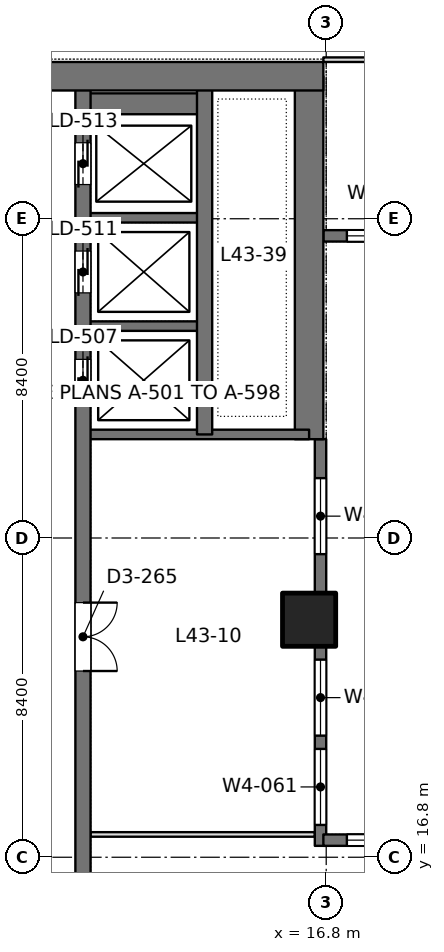
"""IFC4 building model, lengths in metres.
Left out: names, types, materials, properties, quantities, classifications, styles, units other than length and angle.
Written with IfcOpenShell. Run it as: python <this file> out.ifc"""

import sys

from ifc_helpers import new_model, si_unit, direction, frame, frame_2d, origin, origin_2d, place, context, subcontext, project, spatial, rectangle, extrude, element, fill, save


model = new_model("IFC4")
c1 = context("Model", 3, precision=1e-05, world=origin(), true_north=direction((0.0, 1.0)))
c2 = subcontext(c1, "Body", "Model", "MODEL_VIEW")
j1 = project(units=[si_unit("LENGTHUNIT", "METRE"), si_unit("PLANEANGLEUNIT", "RADIAN")], contexts=[c1])
p1 = place(None, origin())
s1 = spatial("IfcSite", under=j1, at=p1, CompositionType="ELEMENT")
p2 = place(p1, origin())
s2 = spatial("IfcBuilding", under=s1, at=p2, CompositionType="ELEMENT")
p3 = place(p2, frame((0.0, 0.0, 190.2)))
s3 = spatial("IfcBuildingStorey", under=s2, at=p3, CompositionType="ELEMENT", Elevation=190.2)
p4 = place(p3, frame((16.35, 23.05, 0.0), z_axis=(0.0, 0.0, 1.0), x_axis=(1.0, 0.0, 0.0)))
e1 = element("IfcColumn", 1, at=p4, inside=s3, PredefinedType="COLUMN", context=c2, shape_type="SweptSolid", body=[
    extrude(rectangle(XDim=1.4, YDim=1.4, at=origin_2d()), origin(), (0.0, 0.0, 1.0), 4.2),
])
p5 = place(p3, frame((-1.125, 37.35, 0.0), z_axis=(0.0, 0.0, 1.0), x_axis=(1.0, 0.0, 0.0)))
e2 = element("IfcWall", 2, at=p5, inside=s3, PredefinedType="SHEAR", context=c2, shape_type="SweptSolid", body=[
    extrude(rectangle(XDim=17.85, YDim=0.75, at=frame_2d((8.925, 0.0))), origin(), (0.0, 0.0, 1.0), 4.2),
])
p6 = place(p5, frame((8.875, 0.0, 0.0)))
e3 = element("IfcOpeningElement", 3, at=p6, cuts=e2, PredefinedType="OPENING", context=c2, shape_type="SweptSolid", body=[
    extrude(rectangle(XDim=1.8, YDim=2.4, at=frame_2d((0.9, 1.2))), frame((0.0, 0.385, 0.0), z_axis=(0.0, -1.0, 0.0), x_axis=(1.0, 0.0, 0.0)), (0.0, 0.0, 1.0), 0.77),
])
p7 = place(p3, frame((16.35, 27.8, 0.0), z_axis=(0.0, 0.0, 1.0), x_axis=(0.0, 1.0, 0.0)))
e4 = element("IfcWall", 4, at=p7, inside=s3, PredefinedType="SHEAR", context=c2, shape_type="SweptSolid", body=[
    extrude(rectangle(XDim=9.55, YDim=0.75, at=frame_2d((4.775, 0.0))), origin(), (0.0, 0.0, 1.0), 4.2),
])
p8 = place(p3, frame((10.4, 13.05, 0.0), z_axis=(0.0, 0.0, 1.0), x_axis=(0.0, 1.0, 0.0)))
e5 = element("IfcWall", 5, at=p8, inside=s3, PredefinedType="SHEAR", context=c2, shape_type="SweptSolid", body=[
    extrude(rectangle(XDim=24.3, YDim=0.4, at=frame_2d((12.15, 0.0))), origin(), (0.0, 0.0, 1.0), 4.2),
])
p9 = place(p8, frame((15.75, 0.0, 0.0)))
e6 = element("IfcOpeningElement", 6, at=p9, cuts=e5, PredefinedType="OPENING", context=c2, shape_type="SweptSolid", body=[
    extrude(rectangle(XDim=1.1, YDim=2.2, at=frame_2d((0.55, 1.1))), frame((0.0, 0.21, 0.0), z_axis=(0.0, -1.0, 0.0), x_axis=(1.0, 0.0, 0.0)), (0.0, 0.0, 1.0), 0.42),
])
p10 = place(p8, frame((18.6, 0.0, 0.0)))
e7 = element("IfcOpeningElement", 7, at=p10, cuts=e5, PredefinedType="OPENING", context=c2, shape_type="SweptSolid", body=[
    extrude(rectangle(XDim=1.1, YDim=2.2, at=frame_2d((0.55, 1.1))), frame((0.0, 0.21, 0.0), z_axis=(0.0, -1.0, 0.0), x_axis=(1.0, 0.0, 0.0)), (0.0, 0.0, 1.0), 0.42),
])
p11 = place(p8, frame((21.45, 0.0, 0.0)))
e8 = element("IfcOpeningElement", 8, at=p11, cuts=e5, PredefinedType="OPENING", context=c2, shape_type="SweptSolid", body=[
    extrude(rectangle(XDim=1.1, YDim=2.2, at=frame_2d((0.55, 1.1))), frame((0.0, 0.21, 0.0), z_axis=(0.0, -1.0, 0.0), x_axis=(1.0, 0.0, 0.0)), (0.0, 0.0, 1.0), 0.42),
])
p12 = place(p8, frame((8.65, 0.0, 0.0)))
e9 = element("IfcOpeningElement", 9, at=p12, cuts=e5, PredefinedType="OPENING", context=c2, shape_type="SweptSolid", body=[
    extrude(rectangle(XDim=1.8, YDim=2.4, at=frame_2d((0.9, 1.2))), frame((0.0, 0.21, 0.0), z_axis=(0.0, -1.0, 0.0), x_axis=(1.0, 0.0, 0.0)), (0.0, 0.0, 1.0), 0.42),
])
p13 = place(p3, frame((13.6, 27.925, 0.0), z_axis=(0.0, 0.0, 1.0), x_axis=(0.0, 1.0, 0.0)))
e10 = element("IfcWall", 10, at=p13, inside=s3, PredefinedType="SHEAR", context=c2, shape_type="SweptSolid", body=[
    extrude(rectangle(XDim=9.425, YDim=0.4, at=frame_2d((4.712, 0.0))), origin(), (0.0, 0.0, 1.0), 4.2),
])
p14 = place(p3, frame((10.4, 27.925, 0.0), z_axis=(0.0, 0.0, 1.0), x_axis=(1.0, 0.0, 0.0)))
e11 = element("IfcWall", 11, at=p14, inside=s3, PredefinedType="SHEAR", context=c2, shape_type="SweptSolid", body=[
    extrude(rectangle(XDim=5.95, YDim=0.25, at=frame_2d((2.975, 0.0))), origin(), (0.0, 0.0, 1.0), 4.2),
])
for number, where, z_axis, x_axis in (
    (12, (10.4, 30.775, 0.0), (0.0, 0.0, 1.0), (1.0, 0.0, 0.0)),
    (13, (10.4, 33.625, 0.0), (0.0, 0.0, 1.0), (1.0, 0.0, 0.0)),
):
    element("IfcWall", number, at=place(p3, frame(where, z_axis=z_axis, x_axis=x_axis)), inside=s3, PredefinedType="SHEAR", context=c2, shape_type="SweptSolid", body=[
        extrude(rectangle(XDim=3.2, YDim=0.25, at=frame_2d((1.6, 0.0))), origin(), (0.0, 0.0, 1.0), 4.2),
    ])
p15 = place(p3, frame((10.4, 36.625, 0.0), z_axis=(0.0, 0.0, 1.0), x_axis=(1.0, 0.0, 0.0)))
e14 = element("IfcWall", 14, at=p15, inside=s3, PredefinedType="SHEAR", context=c2, shape_type="SweptSolid", body=[
    extrude(rectangle(XDim=3.2, YDim=0.55, at=frame_2d((1.6, 0.0))), origin(), (0.0, 0.0, 1.0), 4.2),
])
p16 = place(p3, frame((16.65, 17.1, 0.0), z_axis=(0.0, 0.0, 1.0), x_axis=(0.0, 1.0, 0.0)))
e15 = element("IfcWall", 15, at=p16, inside=s3, PredefinedType="SOLIDWALL", context=c2, shape_type="SweptSolid", body=[
    extrude(rectangle(XDim=10.7, YDim=0.3, at=frame_2d((5.35, 0.0))), origin(), (0.0, 0.0, 1.0), 4.05),
])
p17 = place(p16, frame((0.55, 0.0, 0.9)))
e16 = element("IfcOpeningElement", 16, at=p17, cuts=e15, PredefinedType="OPENING", context=c2, shape_type="SweptSolid", body=[
    extrude(rectangle(XDim=2.0, YDim=1.9, at=frame_2d((1.0, 0.95))), frame((0.0, 0.16, 0.0), z_axis=(0.0, -1.0, 0.0), x_axis=(1.0, 0.0, 0.0)), (0.0, 0.0, 1.0), 0.32),
])
p18 = place(p16, frame((2.9, 0.0, 0.9)))
e17 = element("IfcOpeningElement", 17, at=p18, cuts=e15, PredefinedType="OPENING", context=c2, shape_type="SweptSolid", body=[
    extrude(rectangle(XDim=2.0, YDim=1.9, at=frame_2d((1.0, 0.95))), frame((0.0, 0.16, 0.0), z_axis=(0.0, -1.0, 0.0), x_axis=(1.0, 0.0, 0.0)), (0.0, 0.0, 1.0), 0.32),
])
p19 = place(p16, frame((7.675, 0.0, 0.9)))
e18 = element("IfcOpeningElement", 18, at=p19, cuts=e15, PredefinedType="OPENING", context=c2, shape_type="SweptSolid", body=[
    extrude(rectangle(XDim=2.0, YDim=1.9, at=frame_2d((1.0, 0.95))), frame((0.0, 0.16, 0.0), z_axis=(0.0, -1.0, 0.0), x_axis=(1.0, 0.0, 0.0)), (0.0, 0.0, 1.0), 0.32),
])
p20 = place(p3, frame((16.725, 17.25, 0.0), z_axis=(0.0, 0.0, 1.0), x_axis=(1.0, 0.0, 0.0)))
e19 = element("IfcWall", 19, at=p20, inside=s3, PredefinedType="SOLIDWALL", context=c2, shape_type="SweptSolid", body=[
    extrude(rectangle(XDim=7.925, YDim=0.3, at=frame_2d((3.962, 0.0))), origin(), (0.0, 0.0, 1.0), 4.05),
])
p21 = place(p20, frame((0.619, 0.0, 0.9)))
e20 = element("IfcOpeningElement", 20, at=p21, cuts=e19, PredefinedType="OPENING", context=c2, shape_type="SweptSolid", body=[
    extrude(rectangle(XDim=2.0, YDim=1.9, at=frame_2d((1.0, 0.95))), frame((0.0, 0.16, 0.0), z_axis=(0.0, -1.0, 0.0), x_axis=(1.0, 0.0, 0.0)), (0.0, 0.0, 1.0), 0.32),
])
p22 = place(p20, frame((3.238, 0.0, 0.9)))
e21 = element("IfcOpeningElement", 21, at=p22, cuts=e19, PredefinedType="OPENING", context=c2, shape_type="SweptSolid", body=[
    extrude(rectangle(XDim=2.0, YDim=1.9, at=frame_2d((1.0, 0.95))), frame((0.0, 0.16, 0.0), z_axis=(0.0, -1.0, 0.0), x_axis=(1.0, 0.0, 0.0)), (0.0, 0.0, 1.0), 0.32),
])
p23 = place(p20, frame((5.856, 0.0, 0.9)))
e22 = element("IfcOpeningElement", 22, at=p23, cuts=e19, PredefinedType="OPENING", context=c2, shape_type="SweptSolid", body=[
    extrude(rectangle(XDim=2.0, YDim=1.9, at=frame_2d((1.0, 0.95))), frame((0.0, 0.16, 0.0), z_axis=(0.0, -1.0, 0.0), x_axis=(1.0, 0.0, 0.0)), (0.0, 0.0, 1.0), 0.32),
])
p24 = place(p3, frame((16.725, 33.15, 0.0), z_axis=(0.0, 0.0, 1.0), x_axis=(1.0, 0.0, 0.0)))
e23 = element("IfcWall", 23, at=p24, inside=s3, PredefinedType="SOLIDWALL", context=c2, shape_type="SweptSolid", body=[
    extrude(rectangle(XDim=7.925, YDim=0.3, at=frame_2d((3.962, 0.0))), origin(), (0.0, 0.0, 1.0), 4.05),
])
p25 = place(p24, frame((0.619, 0.0, 0.9)))
e24 = element("IfcOpeningElement", 24, at=p25, cuts=e23, PredefinedType="OPENING", context=c2, shape_type="SweptSolid", body=[
    extrude(rectangle(XDim=2.0, YDim=1.9, at=frame_2d((1.0, 0.95))), frame((0.0, 0.16, 0.0), z_axis=(0.0, -1.0, 0.0), x_axis=(1.0, 0.0, 0.0)), (0.0, 0.0, 1.0), 0.32),
])
p26 = place(p24, frame((3.238, 0.0, 0.9)))
e25 = element("IfcOpeningElement", 25, at=p26, cuts=e23, PredefinedType="OPENING", context=c2, shape_type="SweptSolid", body=[
    extrude(rectangle(XDim=2.0, YDim=1.9, at=frame_2d((1.0, 0.95))), frame((0.0, 0.16, 0.0), z_axis=(0.0, -1.0, 0.0), x_axis=(1.0, 0.0, 0.0)), (0.0, 0.0, 1.0), 0.32),
])
p27 = place(p24, frame((5.856, 0.0, 0.9)))
e26 = element("IfcOpeningElement", 26, at=p27, cuts=e23, PredefinedType="OPENING", context=c2, shape_type="SweptSolid", body=[
    extrude(rectangle(XDim=2.0, YDim=1.9, at=frame_2d((1.0, 0.95))), frame((0.0, 0.16, 0.0), z_axis=(0.0, -1.0, 0.0), x_axis=(1.0, 0.0, 0.0)), (0.0, 0.0, 1.0), 0.32),
])
p28 = place(p3, frame((10.598, 17.4, 0.0), z_axis=(0.0, 0.0, 1.0), x_axis=(1.0, 0.0, 0.0)))
e27 = element("IfcWall", 27, at=p28, inside=s3, PredefinedType="PARTITIONING", context=c2, shape_type="SweptSolid", body=[
    extrude(rectangle(XDim=5.904, YDim=0.12, at=frame_2d((2.952, 0.0))), origin(), (0.0, 0.0, 1.0), 3.55),
])
p29 = place(p3, frame((16.725, 37.785, 0.0), z_axis=(0.0, 0.0, 1.0), x_axis=(1.0, 0.0, 0.0)))
e28 = element("IfcWall", 28, at=p29, inside=s3, PredefinedType="PARTITIONING", context=c2, shape_type="SweptSolid", body=[
    extrude(rectangle(XDim=16.95, YDim=0.12, at=frame_2d((8.475, 0.0))), origin(), (0.0, 0.0, 1.0), 3.55),
])
p30 = place(p29, frame((7.575, 0.0, 0.0)))
e29 = element("IfcOpeningElement", 29, at=p30, cuts=e28, PredefinedType="OPENING", context=c2, shape_type="SweptSolid", body=[
    extrude(rectangle(XDim=1.8, YDim=2.2, at=frame_2d((0.9, 1.1))), frame((0.0, 0.07, 0.0), z_axis=(0.0, -1.0, 0.0), x_axis=(1.0, 0.0, 0.0)), (0.0, 0.0, 1.0), 0.14),
])
p31 = place(p17, origin())
e30 = element("IfcWindow", 30, at=p31, inside=s3, PartitioningType="SINGLE_PANEL", PredefinedType="WINDOW", context=c2, shape_type="SweptSolid", body=[
    extrude(rectangle(XDim=2.0, YDim=1.9, at=frame_2d((1.0, 0.95))), frame((0.0, 0.03, 0.0), z_axis=(0.0, -1.0, 0.0), x_axis=(1.0, 0.0, 0.0)), (0.0, 0.0, 1.0), 0.06),
])
fill(e16, e30)
p32 = place(p18, origin())
e31 = element("IfcWindow", 31, at=p32, inside=s3, PartitioningType="SINGLE_PANEL", PredefinedType="WINDOW", context=c2, shape_type="SweptSolid", body=[
    extrude(rectangle(XDim=2.0, YDim=1.9, at=frame_2d((1.0, 0.95))), frame((0.0, 0.03, 0.0), z_axis=(0.0, -1.0, 0.0), x_axis=(1.0, 0.0, 0.0)), (0.0, 0.0, 1.0), 0.06),
])
fill(e17, e31)
p33 = place(p19, origin())
e32 = element("IfcWindow", 32, at=p33, inside=s3, PartitioningType="SINGLE_PANEL", PredefinedType="WINDOW", context=c2, shape_type="SweptSolid", body=[
    extrude(rectangle(XDim=2.0, YDim=1.9, at=frame_2d((1.0, 0.95))), frame((0.0, 0.03, 0.0), z_axis=(0.0, -1.0, 0.0), x_axis=(1.0, 0.0, 0.0)), (0.0, 0.0, 1.0), 0.06),
])
fill(e18, e32)
p34 = place(p21, origin())
e33 = element("IfcWindow", 33, at=p34, inside=s3, PartitioningType="SINGLE_PANEL", PredefinedType="WINDOW", context=c2, shape_type="SweptSolid", body=[
    extrude(rectangle(XDim=2.0, YDim=1.9, at=frame_2d((1.0, 0.95))), frame((0.0, 0.03, 0.0), z_axis=(0.0, -1.0, 0.0), x_axis=(1.0, 0.0, 0.0)), (0.0, 0.0, 1.0), 0.06),
])
fill(e20, e33)
p35 = place(p25, origin())
e34 = element("IfcWindow", 34, at=p35, inside=s3, PartitioningType="SINGLE_PANEL", PredefinedType="WINDOW", context=c2, shape_type="SweptSolid", body=[
    extrude(rectangle(XDim=2.0, YDim=1.9, at=frame_2d((1.0, 0.95))), frame((0.0, 0.03, 0.0), z_axis=(0.0, -1.0, 0.0), x_axis=(1.0, 0.0, 0.0)), (0.0, 0.0, 1.0), 0.06),
])
fill(e24, e34)
p36 = place(p9, origin())
e35 = element("IfcDoor", 35, at=p36, inside=s3, OperationType="DOUBLE_DOOR_SLIDING", PredefinedType="DOOR", context=c2, shape_type="SweptSolid", body=[
    extrude(rectangle(XDim=1.1, YDim=2.2, at=frame_2d((0.55, 1.1))), frame((0.0, 0.025, 0.0), z_axis=(0.0, -1.0, 0.0), x_axis=(1.0, 0.0, 0.0)), (0.0, 0.0, 1.0), 0.05),
])
fill(e6, e35)
p37 = place(p10, origin())
e36 = element("IfcDoor", 36, at=p37, inside=s3, OperationType="DOUBLE_DOOR_SLIDING", PredefinedType="DOOR", context=c2, shape_type="SweptSolid", body=[
    extrude(rectangle(XDim=1.1, YDim=2.2, at=frame_2d((0.55, 1.1))), frame((0.0, 0.025, 0.0), z_axis=(0.0, -1.0, 0.0), x_axis=(1.0, 0.0, 0.0)), (0.0, 0.0, 1.0), 0.05),
])
fill(e7, e36)
p38 = place(p11, origin())
e37 = element("IfcDoor", 37, at=p38, inside=s3, OperationType="DOUBLE_DOOR_SLIDING", PredefinedType="DOOR", context=c2, shape_type="SweptSolid", body=[
    extrude(rectangle(XDim=1.1, YDim=2.2, at=frame_2d((0.55, 1.1))), frame((0.0, 0.025, 0.0), z_axis=(0.0, -1.0, 0.0), x_axis=(1.0, 0.0, 0.0)), (0.0, 0.0, 1.0), 0.05),
])
fill(e8, e37)
p39 = place(p12, frame((1.8, 0.0, 0.0), z_axis=(0.0, 0.0, 1.0), x_axis=(-1.0, 0.0, 0.0)))
e38 = element("IfcDoor", 38, at=p39, inside=s3, OperationType="DOUBLE_DOOR_SINGLE_SWING", PredefinedType="DOOR", context=c2, shape_type="SweptSolid", body=[
    extrude(rectangle(XDim=1.8, YDim=2.4, at=frame_2d((0.9, 1.2))), frame((0.0, 0.025, 0.0), z_axis=(0.0, -1.0, 0.0), x_axis=(1.0, 0.0, 0.0)), (0.0, 0.0, 1.0), 0.05),
])
fill(e9, e38)
save(model, sys.argv[1])
